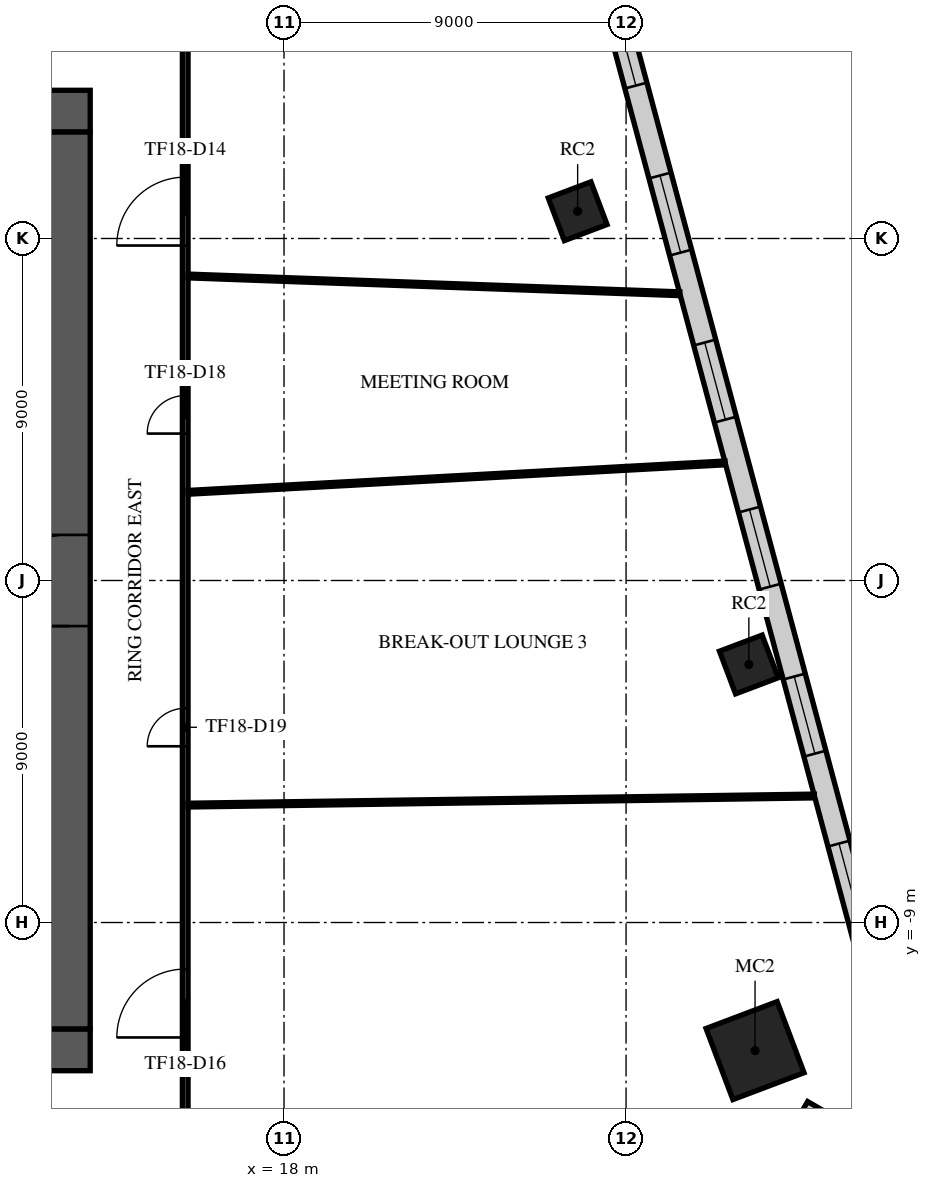
"""IFC4 building model, lengths in metres.
Left out: names, types, materials, properties, quantities, classifications, styles, units other than length and angle.
Written with IfcOpenShell. Run it as: python <this file> out.ifc"""

import sys

from ifc_helpers import new_model, si_unit, direction, frame, frame_2d, origin, origin_2d, place, context, subcontext, project, spatial, rectangle, extrude, element, fill, save


model = new_model("IFC4")
c1 = context("Model", 3, precision=1e-05, world=origin(), true_north=direction((0.0, 1.0)))
c2 = subcontext(c1, "Body", "Model", "MODEL_VIEW")
j1 = project(units=[si_unit("LENGTHUNIT", "METRE"), si_unit("PLANEANGLEUNIT", "RADIAN")], contexts=[c1])
p1 = place(None, origin())
s1 = spatial("IfcSite", under=j1, at=p1, CompositionType="ELEMENT")
p2 = place(p1, origin())
s2 = spatial("IfcBuilding", under=s1, at=p2, CompositionType="ELEMENT")
p3 = place(p2, frame((0.0, 0.0, 86.1)))
s3 = spatial("IfcBuildingStorey", under=s2, at=p3, CompositionType="ELEMENT", Elevation=86.1)
p4 = place(p3, frame((30.394, -12.371, 0.0), z_axis=(0.0, 0.0, 1.0), x_axis=(0.935491525991, 0.353349125935, 0.0)))
e1 = element("IfcColumn", 1, at=p4, inside=s3, PredefinedType="COLUMN", context=c2, shape_type="SweptSolid", body=[
    extrude(rectangle(XDim=2.0, YDim=2.0, at=origin_2d()), origin(), (0.0, 0.0, 1.0), 4.0),
])
for number, where, z_axis, x_axis in (
    (2, (30.231, -2.21, 0.0), (0.0, 0.0, 1.0), (0.935, 0.353, 0.0)),
    (3, (25.726, 9.717, 0.0), (0.0, 0.0, 1.0), (0.935, 0.353, 0.0)),
):
    element("IfcColumn", number, at=place(p3, frame(where, z_axis=z_axis, x_axis=x_axis)), inside=s3, PredefinedType="COLUMN", context=c2, shape_type="SweptSolid", body=[
        extrude(rectangle(XDim=1.2, YDim=1.2, at=origin_2d()), origin(), (0.0, 0.0, 1.0), 4.0),
    ])
p5 = place(p3, frame((-12.9, 12.35, 0.0), z_axis=(0.0, 0.0, 1.0), x_axis=(1.0, 0.0, 0.0)))
e4 = element("IfcWall", 4, at=p5, inside=s3, PredefinedType="SHEAR", context=c2, shape_type="SweptSolid", body=[
    extrude(rectangle(XDim=25.8, YDim=1.1, at=frame_2d((12.9, 0.0))), origin(), (0.0, 0.0, 1.0), 3.58),
])
p6 = place(p5, frame((11.7, 0.0, 0.0)))
e5 = element("IfcOpeningElement", 5, at=p6, cuts=e4, PredefinedType="OPENING", context=c2, shape_type="SweptSolid", body=[
    extrude(rectangle(XDim=2.4, YDim=2.4, at=frame_2d((1.2, 1.2))), frame((0.0, 0.56, 0.0), z_axis=(0.0, -1.0, 0.0), x_axis=(1.0, 0.0, 0.0)), (0.0, 0.0, 1.0), 1.12),
])
p7 = place(p5, frame((22.525, 0.0, 0.0)))
e6 = element("IfcOpeningElement", 6, at=p7, cuts=e4, PredefinedType="OPENING", context=c2, shape_type="SweptSolid", body=[
    extrude(rectangle(XDim=1.2, YDim=2.1, at=frame_2d((0.6, 1.05))), frame((0.0, 0.56, 0.0), z_axis=(0.0, -1.0, 0.0), x_axis=(1.0, 0.0, 0.0)), (0.0, 0.0, 1.0), 1.12),
])
p8 = place(p5, frame((1.5, 0.0, 0.0)))
e7 = element("IfcOpeningElement", 7, at=p8, cuts=e4, PredefinedType="OPENING", context=c2, shape_type="SweptSolid", body=[
    extrude(rectangle(XDim=1.0, YDim=2.1, at=frame_2d((0.5, 1.05))), frame((0.0, 0.56, 0.0), z_axis=(0.0, -1.0, 0.0), x_axis=(1.0, 0.0, 0.0)), (0.0, 0.0, 1.0), 1.12),
])
p9 = place(p3, frame((-12.9, -12.35, 0.0), z_axis=(0.0, 0.0, 1.0), x_axis=(1.0, 0.0, 0.0)))
e8 = element("IfcWall", 8, at=p9, inside=s3, PredefinedType="SHEAR", context=c2, shape_type="SweptSolid", body=[
    extrude(rectangle(XDim=25.8, YDim=1.1, at=frame_2d((12.9, 0.0))), origin(), (0.0, 0.0, 1.0), 3.58),
])
p10 = place(p9, frame((7.8, 0.0, 0.0)))
e9 = element("IfcOpeningElement", 9, at=p10, cuts=e8, PredefinedType="OPENING", context=c2, shape_type="SweptSolid", body=[
    extrude(rectangle(XDim=2.0, YDim=2.1, at=frame_2d((1.0, 1.05))), frame((0.0, 0.56, 0.0), z_axis=(0.0, -1.0, 0.0), x_axis=(1.0, 0.0, 0.0)), (0.0, 0.0, 1.0), 1.12),
])
p11 = place(p9, frame((17.925, 0.0, 0.0)))
e10 = element("IfcOpeningElement", 10, at=p11, cuts=e8, PredefinedType="OPENING", context=c2, shape_type="SweptSolid", body=[
    extrude(rectangle(XDim=1.2, YDim=2.1, at=frame_2d((0.6, 1.05))), frame((0.0, 0.56, 0.0), z_axis=(0.0, -1.0, 0.0), x_axis=(1.0, 0.0, 0.0)), (0.0, 0.0, 1.0), 1.12),
])
p12 = place(p9, frame((2.075, 0.0, 0.0)))
e11 = element("IfcOpeningElement", 11, at=p12, cuts=e8, PredefinedType="OPENING", context=c2, shape_type="SweptSolid", body=[
    extrude(rectangle(XDim=1.2, YDim=2.1, at=frame_2d((0.6, 1.05))), frame((0.0, 0.56, 0.0), z_axis=(0.0, -1.0, 0.0), x_axis=(1.0, 0.0, 0.0)), (0.0, 0.0, 1.0), 1.12),
])
p13 = place(p9, frame((22.525, 0.0, 0.0)))
e12 = element("IfcOpeningElement", 12, at=p13, cuts=e8, PredefinedType="OPENING", context=c2, shape_type="SweptSolid", body=[
    extrude(rectangle(XDim=1.2, YDim=2.1, at=frame_2d((0.6, 1.05))), frame((0.0, 0.56, 0.0), z_axis=(0.0, -1.0, 0.0), x_axis=(1.0, 0.0, 0.0)), (0.0, 0.0, 1.0), 1.12),
])
p14 = place(p3, frame((12.35, -11.8, 0.0), z_axis=(0.0, 0.0, 1.0), x_axis=(0.0, 1.0, 0.0)))
e13 = element("IfcWall", 13, at=p14, inside=s3, PredefinedType="SHEAR", context=c2, shape_type="SweptSolid", body=[
    extrude(rectangle(XDim=23.6, YDim=1.1, at=frame_2d((11.8, 0.0))), origin(), (0.0, 0.0, 1.0), 3.58),
])
p15 = place(p14, frame((10.6, 0.0, 0.0)))
e14 = element("IfcOpeningElement", 14, at=p15, cuts=e13, PredefinedType="OPENING", context=c2, shape_type="SweptSolid", body=[
    extrude(rectangle(XDim=2.4, YDim=2.4, at=frame_2d((1.2, 1.2))), frame((0.0, 0.56, 0.0), z_axis=(0.0, -1.0, 0.0), x_axis=(1.0, 0.0, 0.0)), (0.0, 0.0, 1.0), 1.12),
])
p16 = place(p3, frame((31.628, -13.972, 0.0), z_axis=(0.0, 0.0, 1.0), x_axis=(0.866022959057, -0.500004234368, 0.0)))
e15 = element("IfcWall", 15, at=p16, inside=s3, PredefinedType="STANDARD", context=c2, shape_type="SweptSolid", body=[
    extrude(rectangle(XDim=2.5, YDim=0.6, at=frame_2d((1.25, 0.0))), origin(), (0.0, 0.0, 1.0), 3.58),
])
p17 = place(p3, frame((34.609, -14.409, 0.0), z_axis=(0.0, 0.0, 1.0), x_axis=(-0.258819814566, 0.965925620112, 0.0)))
e16 = element("IfcWall", 16, at=p17, inside=s3, PredefinedType="STANDARD", context=c2, shape_type="SweptSolid", body=[
    extrude(rectangle(XDim=45.376, YDim=0.6, at=frame_2d((22.688, 0.0))), origin(), (0.0, 0.0, 1.0), 3.58),
])
p18 = place(p17, frame((1.163, 0.0, 0.9)))
e17 = element("IfcOpeningElement", 17, at=p18, cuts=e16, PredefinedType="OPENING", context=c2, shape_type="SweptSolid", body=[
    extrude(rectangle(XDim=2.1, YDim=2.1, at=frame_2d((1.05, 1.05))), frame((0.0, 0.31, 0.0), z_axis=(0.0, -1.0, 0.0), x_axis=(1.0, 0.0, 0.0)), (0.0, 0.0, 1.0), 0.62),
])
p19 = place(p17, frame((5.651, 0.0, 0.9)))
e18 = element("IfcOpeningElement", 18, at=p19, cuts=e16, PredefinedType="OPENING", context=c2, shape_type="SweptSolid", body=[
    extrude(rectangle(XDim=2.1, YDim=2.1, at=frame_2d((1.05, 1.05))), frame((0.0, 0.31, 0.0), z_axis=(0.0, -1.0, 0.0), x_axis=(1.0, 0.0, 0.0)), (0.0, 0.0, 1.0), 0.62),
])
p20 = place(p17, frame((10.201, 0.0, 0.9)))
e19 = element("IfcOpeningElement", 19, at=p20, cuts=e16, PredefinedType="OPENING", context=c2, shape_type="SweptSolid", body=[
    extrude(rectangle(XDim=2.1, YDim=2.1, at=frame_2d((1.05, 1.05))), frame((0.0, 0.31, 0.0), z_axis=(0.0, -1.0, 0.0), x_axis=(1.0, 0.0, 0.0)), (0.0, 0.0, 1.0), 0.62),
])
p21 = place(p17, frame((14.751, 0.0, 0.9)))
e20 = element("IfcOpeningElement", 20, at=p21, cuts=e16, PredefinedType="OPENING", context=c2, shape_type="SweptSolid", body=[
    extrude(rectangle(XDim=2.1, YDim=2.1, at=frame_2d((1.05, 1.05))), frame((0.0, 0.31, 0.0), z_axis=(0.0, -1.0, 0.0), x_axis=(1.0, 0.0, 0.0)), (0.0, 0.0, 1.0), 0.62),
])
p22 = place(p17, frame((19.301, 0.0, 0.9)))
e21 = element("IfcOpeningElement", 21, at=p22, cuts=e16, PredefinedType="OPENING", context=c2, shape_type="SweptSolid", body=[
    extrude(rectangle(XDim=2.1, YDim=2.1, at=frame_2d((1.05, 1.05))), frame((0.0, 0.31, 0.0), z_axis=(0.0, -1.0, 0.0), x_axis=(1.0, 0.0, 0.0)), (0.0, 0.0, 1.0), 0.62),
])
p23 = place(p17, frame((23.851, 0.0, 0.9)))
e22 = element("IfcOpeningElement", 22, at=p23, cuts=e16, PredefinedType="OPENING", context=c2, shape_type="SweptSolid", body=[
    extrude(rectangle(XDim=2.1, YDim=2.1, at=frame_2d((1.05, 1.05))), frame((0.0, 0.31, 0.0), z_axis=(0.0, -1.0, 0.0), x_axis=(1.0, 0.0, 0.0)), (0.0, 0.0, 1.0), 0.62),
])
p24 = place(p17, frame((28.401, 0.0, 0.9)))
e23 = element("IfcOpeningElement", 23, at=p24, cuts=e16, PredefinedType="OPENING", context=c2, shape_type="SweptSolid", body=[
    extrude(rectangle(XDim=2.1, YDim=2.1, at=frame_2d((1.05, 1.05))), frame((0.0, 0.31, 0.0), z_axis=(0.0, -1.0, 0.0), x_axis=(1.0, 0.0, 0.0)), (0.0, 0.0, 1.0), 0.62),
])
p25 = place(p17, frame((32.951, 0.0, 0.9)))
e24 = element("IfcOpeningElement", 24, at=p25, cuts=e16, PredefinedType="OPENING", context=c2, shape_type="SweptSolid", body=[
    extrude(rectangle(XDim=2.1, YDim=2.1, at=frame_2d((1.05, 1.05))), frame((0.0, 0.31, 0.0), z_axis=(0.0, -1.0, 0.0), x_axis=(1.0, 0.0, 0.0)), (0.0, 0.0, 1.0), 0.62),
])
p26 = place(p17, frame((37.501, 0.0, 0.9)))
e25 = element("IfcOpeningElement", 25, at=p26, cuts=e16, PredefinedType="OPENING", context=c2, shape_type="SweptSolid", body=[
    extrude(rectangle(XDim=2.1, YDim=2.1, at=frame_2d((1.05, 1.05))), frame((0.0, 0.31, 0.0), z_axis=(0.0, -1.0, 0.0), x_axis=(1.0, 0.0, 0.0)), (0.0, 0.0, 1.0), 0.62),
])
p27 = place(p17, frame((42.051, 0.0, 0.9)))
e26 = element("IfcOpeningElement", 26, at=p27, cuts=e16, PredefinedType="OPENING", context=c2, shape_type="SweptSolid", body=[
    extrude(rectangle(XDim=2.1, YDim=2.1, at=frame_2d((1.05, 1.05))), frame((0.0, 0.31, 0.0), z_axis=(0.0, -1.0, 0.0), x_axis=(1.0, 0.0, 0.0)), (0.0, 0.0, 1.0), 0.62),
])
p28 = place(p3, frame((15.4, -15.325, 0.0), z_axis=(0.0, 0.0, 1.0), x_axis=(0.0, 1.0, 0.0)))
e27 = element("IfcWall", 27, at=p28, inside=s3, PredefinedType="PARTITIONING", context=c2, shape_type="SweptSolid", body=[
    extrude(rectangle(XDim=30.65, YDim=0.15, at=frame_2d((15.325, 0.0))), origin(), (0.0, 0.0, 1.0), 3.08),
])
p29 = place(p28, frame((24.14, 0.0, 0.0)))
e28 = element("IfcOpeningElement", 28, at=p29, cuts=e27, PredefinedType="OPENING", context=c2, shape_type="SweptSolid", body=[
    extrude(rectangle(XDim=1.8, YDim=2.1, at=frame_2d((0.9, 1.05))), frame((0.0, 0.085, 0.0), z_axis=(0.0, -1.0, 0.0), x_axis=(1.0, 0.0, 0.0)), (0.0, 0.0, 1.0), 0.17),
])
p30 = place(p28, frame((3.3, 0.0, 0.0)))
e29 = element("IfcOpeningElement", 29, at=p30, cuts=e27, PredefinedType="OPENING", context=c2, shape_type="SweptSolid", body=[
    extrude(rectangle(XDim=1.8, YDim=2.1, at=frame_2d((0.9, 1.05))), frame((0.0, 0.085, 0.0), z_axis=(0.0, -1.0, 0.0), x_axis=(1.0, 0.0, 0.0)), (0.0, 0.0, 1.0), 0.17),
])
p31 = place(p28, frame((19.191, 0.0, 0.0)))
e30 = element("IfcOpeningElement", 30, at=p31, cuts=e27, PredefinedType="OPENING", context=c2, shape_type="SweptSolid", body=[
    extrude(rectangle(XDim=1.0, YDim=2.1, at=frame_2d((0.5, 1.05))), frame((0.0, 0.085, 0.0), z_axis=(0.0, -1.0, 0.0), x_axis=(1.0, 0.0, 0.0)), (0.0, 0.0, 1.0), 0.17),
])
p32 = place(p28, frame((10.963, 0.0, 0.0)))
e31 = element("IfcOpeningElement", 31, at=p32, cuts=e27, PredefinedType="OPENING", context=c2, shape_type="SweptSolid", body=[
    extrude(rectangle(XDim=1.0, YDim=2.1, at=frame_2d((0.5, 1.05))), frame((0.0, 0.085, 0.0), z_axis=(0.0, -1.0, 0.0), x_axis=(1.0, 0.0, 0.0)), (0.0, 0.0, 1.0), 0.17),
])
p33 = place(p3, frame((15.476, -5.911, 0.0), z_axis=(0.0, 0.0, 1.0), x_axis=(0.999893970636, 0.014561850324, 0.0)))
e32 = element("IfcWall", 32, at=p33, inside=s3, PredefinedType="PARTITIONING", context=c2, shape_type="SweptSolid", body=[
    extrude(rectangle(XDim=16.481, YDim=0.1, at=frame_2d((8.24, 0.0))), origin(), (0.0, 0.0, 1.0), 3.58),
])
p34 = place(p3, frame((15.478, 2.32, 0.0), z_axis=(0.0, 0.0, 1.0), x_axis=(0.998502061924, 0.054714096293, 0.0)))
e33 = element("IfcWall", 33, at=p34, inside=s3, PredefinedType="PARTITIONING", context=c2, shape_type="SweptSolid", body=[
    extrude(rectangle(XDim=14.149, YDim=0.1, at=frame_2d((7.075, 0.0))), origin(), (0.0, 0.0, 1.0), 3.58),
])
p35 = place(p3, frame((15.477, 8.013, 0.0), z_axis=(0.0, 0.0, 1.0), x_axis=(0.999348235862, -0.036098524609, 0.0)))
e34 = element("IfcWall", 34, at=p35, inside=s3, PredefinedType="PARTITIONING", context=c2, shape_type="SweptSolid", body=[
    extrude(rectangle(XDim=12.945, YDim=0.1, at=frame_2d((6.472, 0.0))), origin(), (0.0, 0.0, 1.0), 3.58),
])
p36 = place(p15, origin())
e35 = element("IfcDoor", 35, at=p36, inside=s3, OperationType="SINGLE_SWING_LEFT", PredefinedType="DOOR", context=c2, shape_type="SweptSolid", body=[
    extrude(rectangle(XDim=2.4, YDim=2.4, at=frame_2d((1.2, 1.2))), frame((0.0, 0.025, 0.0), z_axis=(0.0, -1.0, 0.0), x_axis=(1.0, 0.0, 0.0)), (0.0, 0.0, 1.0), 0.05),
])
fill(e14, e35)
p37 = place(p19, origin())
e36 = element("IfcWindow", 36, at=p37, inside=s3, PartitioningType="SINGLE_PANEL", PredefinedType="WINDOW", context=c2, shape_type="SweptSolid", body=[
    extrude(rectangle(XDim=2.1, YDim=2.1, at=frame_2d((1.05, 1.05))), frame((0.0, 0.03, 0.0), z_axis=(0.0, -1.0, 0.0), x_axis=(1.0, 0.0, 0.0)), (0.0, 0.0, 1.0), 0.06),
])
fill(e18, e36)
p38 = place(p20, origin())
e37 = element("IfcWindow", 37, at=p38, inside=s3, PartitioningType="SINGLE_PANEL", PredefinedType="WINDOW", context=c2, shape_type="SweptSolid", body=[
    extrude(rectangle(XDim=2.1, YDim=2.1, at=frame_2d((1.05, 1.05))), frame((0.0, 0.03, 0.0), z_axis=(0.0, -1.0, 0.0), x_axis=(1.0, 0.0, 0.0)), (0.0, 0.0, 1.0), 0.06),
])
fill(e19, e37)
p39 = place(p21, origin())
e38 = element("IfcWindow", 38, at=p39, inside=s3, PartitioningType="SINGLE_PANEL", PredefinedType="WINDOW", context=c2, shape_type="SweptSolid", body=[
    extrude(rectangle(XDim=2.1, YDim=2.1, at=frame_2d((1.05, 1.05))), frame((0.0, 0.03, 0.0), z_axis=(0.0, -1.0, 0.0), x_axis=(1.0, 0.0, 0.0)), (0.0, 0.0, 1.0), 0.06),
])
fill(e20, e38)
p40 = place(p22, origin())
e39 = element("IfcWindow", 39, at=p40, inside=s3, PartitioningType="SINGLE_PANEL", PredefinedType="WINDOW", context=c2, shape_type="SweptSolid", body=[
    extrude(rectangle(XDim=2.1, YDim=2.1, at=frame_2d((1.05, 1.05))), frame((0.0, 0.03, 0.0), z_axis=(0.0, -1.0, 0.0), x_axis=(1.0, 0.0, 0.0)), (0.0, 0.0, 1.0), 0.06),
])
fill(e21, e39)
p41 = place(p23, origin())
e40 = element("IfcWindow", 40, at=p41, inside=s3, PartitioningType="SINGLE_PANEL", PredefinedType="WINDOW", context=c2, shape_type="SweptSolid", body=[
    extrude(rectangle(XDim=2.1, YDim=2.1, at=frame_2d((1.05, 1.05))), frame((0.0, 0.03, 0.0), z_axis=(0.0, -1.0, 0.0), x_axis=(1.0, 0.0, 0.0)), (0.0, 0.0, 1.0), 0.06),
])
fill(e22, e40)
p42 = place(p24, origin())
e41 = element("IfcWindow", 41, at=p42, inside=s3, PartitioningType="SINGLE_PANEL", PredefinedType="WINDOW", context=c2, shape_type="SweptSolid", body=[
    extrude(rectangle(XDim=2.1, YDim=2.1, at=frame_2d((1.05, 1.05))), frame((0.0, 0.03, 0.0), z_axis=(0.0, -1.0, 0.0), x_axis=(1.0, 0.0, 0.0)), (0.0, 0.0, 1.0), 0.06),
])
fill(e23, e41)
p43 = place(p29, frame((1.8, 0.0, 0.0), z_axis=(0.0, 0.0, 1.0), x_axis=(-1.0, 0.0, 0.0)))
e42 = element("IfcDoor", 42, at=p43, inside=s3, OperationType="DOUBLE_DOOR_SINGLE_SWING", PredefinedType="DOOR", context=c2, shape_type="SweptSolid", body=[
    extrude(rectangle(XDim=1.8, YDim=2.1, at=frame_2d((0.9, 1.05))), frame((0.0, 0.025, 0.0), z_axis=(0.0, -1.0, 0.0), x_axis=(1.0, 0.0, 0.0)), (0.0, 0.0, 1.0), 0.05),
])
fill(e28, e42)
p44 = place(p30, frame((1.8, 0.0, 0.0), z_axis=(0.0, 0.0, 1.0), x_axis=(-1.0, 0.0, 0.0)))
e43 = element("IfcDoor", 43, at=p44, inside=s3, OperationType="DOUBLE_DOOR_SINGLE_SWING", PredefinedType="DOOR", context=c2, shape_type="SweptSolid", body=[
    extrude(rectangle(XDim=1.8, YDim=2.1, at=frame_2d((0.9, 1.05))), frame((0.0, 0.025, 0.0), z_axis=(0.0, -1.0, 0.0), x_axis=(1.0, 0.0, 0.0)), (0.0, 0.0, 1.0), 0.05),
])
fill(e29, e43)
p45 = place(p31, frame((1.0, 0.0, 0.0), z_axis=(0.0, 0.0, 1.0), x_axis=(-1.0, 0.0, 0.0)))
e44 = element("IfcDoor", 44, at=p45, inside=s3, OperationType="SINGLE_SWING_RIGHT", PredefinedType="DOOR", context=c2, shape_type="SweptSolid", body=[
    extrude(rectangle(XDim=1.0, YDim=2.1, at=frame_2d((0.5, 1.05))), frame((0.0, 0.025, 0.0), z_axis=(0.0, -1.0, 0.0), x_axis=(1.0, 0.0, 0.0)), (0.0, 0.0, 1.0), 0.05),
])
fill(e30, e44)
p46 = place(p32, frame((1.0, 0.0, 0.0), z_axis=(0.0, 0.0, 1.0), x_axis=(-1.0, 0.0, 0.0)))
e45 = element("IfcDoor", 45, at=p46, inside=s3, OperationType="SINGLE_SWING_RIGHT", PredefinedType="DOOR", context=c2, shape_type="SweptSolid", body=[
    extrude(rectangle(XDim=1.0, YDim=2.1, at=frame_2d((0.5, 1.05))), frame((0.0, 0.025, 0.0), z_axis=(0.0, -1.0, 0.0), x_axis=(1.0, 0.0, 0.0)), (0.0, 0.0, 1.0), 0.05),
])
fill(e31, e45)
save(model, sys.argv[1])
